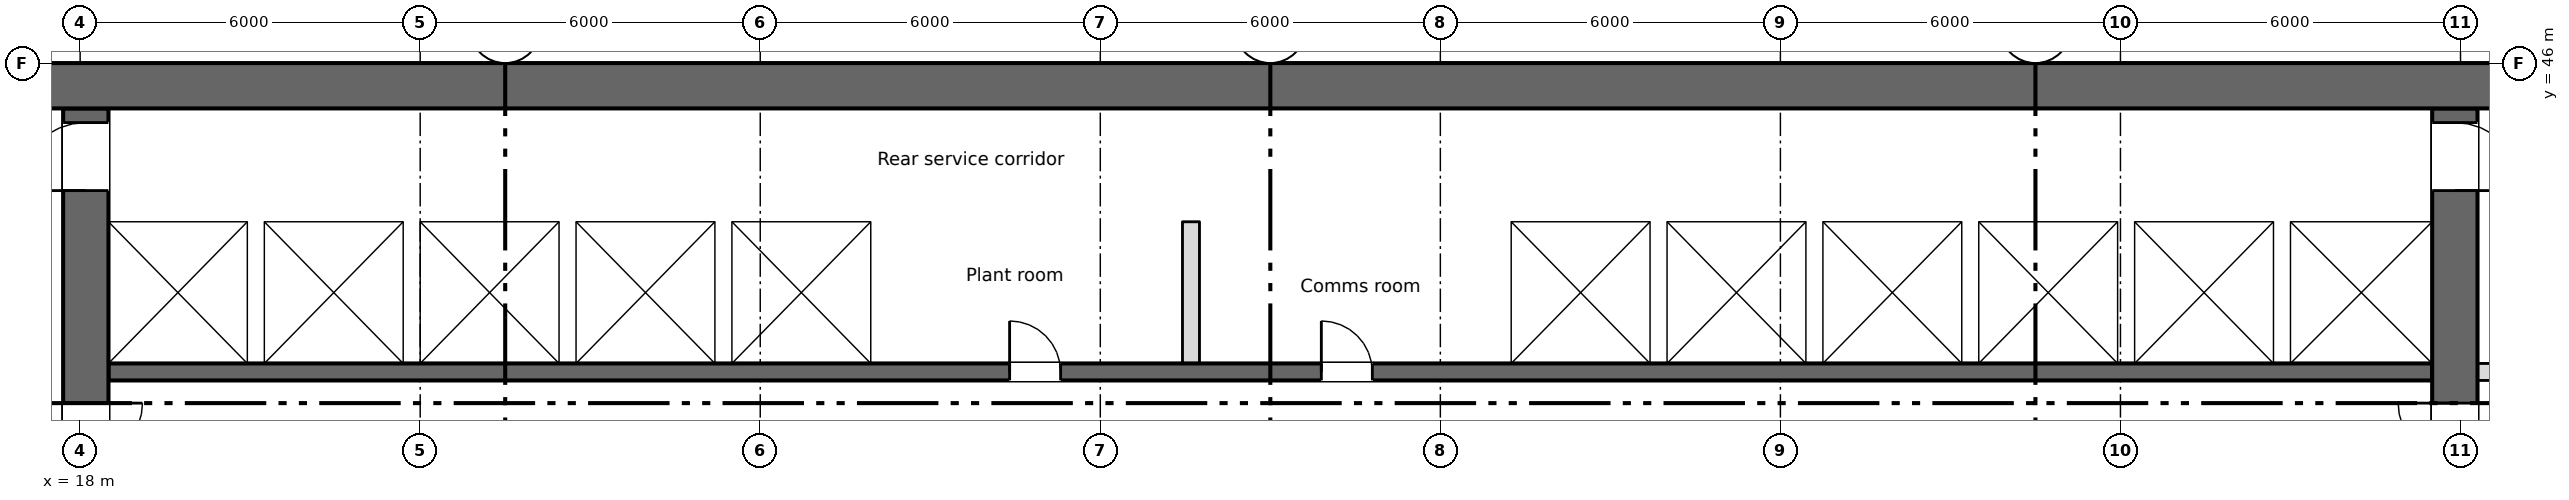
"""IFC4 building model, lengths in metres.
Left out: names, types, materials, properties, quantities, classifications, styles, units other than length and angle.
Written with IfcOpenShell. Run it as: python <this file> out.ifc"""

import sys

from ifc_helpers import new_model, si_unit, direction, frame, frame_2d, origin, place, context, subcontext, project, spatial, rectangle, extrude, element, fill, save


model = new_model("IFC4")
c1 = context("Model", 3, precision=1e-05, world=origin(), true_north=direction((0.0, 1.0)))
c2 = subcontext(c1, "Body", "Model", "MODEL_VIEW")
j1 = project(units=[si_unit("LENGTHUNIT", "METRE"), si_unit("PLANEANGLEUNIT", "RADIAN")], contexts=[c1])
p1 = place(None, origin())
s1 = spatial("IfcSite", under=j1, at=p1, CompositionType="ELEMENT")
p2 = place(p1, origin())
s2 = spatial("IfcBuilding", under=s1, at=p2, CompositionType="ELEMENT")
p3 = place(p2, frame((0.0, 0.0, 132.5)))
s3 = spatial("IfcBuildingStorey", under=s2, at=p3, CompositionType="ELEMENT", Elevation=132.5)
p4 = place(p3, frame((5.55, 45.6, 0.0), z_axis=(0.0, 0.0, 1.0), x_axis=(1.0, 0.0, 0.0)))
e1 = element("IfcWall", 1, at=p4, inside=s3, PredefinedType="SHEAR", context=c2, shape_type="SweptSolid", body=[
    extrude(rectangle(XDim=60.9, YDim=0.8, at=frame_2d((30.45, 0.0))), origin(), (0.0, 0.0, 1.0), 3.35),
])
p5 = place(p4, frame((1.2, 0.0, 0.6)))
e2 = element("IfcOpeningElement", 2, at=p5, cuts=e1, PredefinedType="OPENING", context=c2, shape_type="SweptSolid", body=[
    extrude(rectangle(XDim=0.6, YDim=2.4, at=frame_2d((0.3, 1.2))), frame((0.0, 0.41, 0.0), z_axis=(0.0, -1.0, 0.0), x_axis=(1.0, 0.0, 0.0)), (0.0, 0.0, 1.0), 0.82),
])
p6 = place(p4, frame((7.2, 0.0, 0.6)))
e3 = element("IfcOpeningElement", 3, at=p6, cuts=e1, PredefinedType="OPENING", context=c2, shape_type="SweptSolid", body=[
    extrude(rectangle(XDim=0.6, YDim=2.4, at=frame_2d((0.3, 1.2))), frame((0.0, 0.41, 0.0), z_axis=(0.0, -1.0, 0.0), x_axis=(1.0, 0.0, 0.0)), (0.0, 0.0, 1.0), 0.82),
])
p7 = place(p4, frame((55.2, 0.0, 0.6)))
e4 = element("IfcOpeningElement", 4, at=p7, cuts=e1, PredefinedType="OPENING", context=c2, shape_type="SweptSolid", body=[
    extrude(rectangle(XDim=0.6, YDim=2.4, at=frame_2d((0.3, 1.2))), frame((0.0, 0.41, 0.0), z_axis=(0.0, -1.0, 0.0), x_axis=(1.0, 0.0, 0.0)), (0.0, 0.0, 1.0), 0.82),
])
p8 = place(p3, frame((18.1, 28.4, 0.0), z_axis=(0.0, 0.0, 1.0), x_axis=(0.0, 1.0, 0.0)))
e5 = element("IfcWall", 5, at=p8, inside=s3, PredefinedType="SHEAR", context=c2, shape_type="SweptSolid", body=[
    extrude(rectangle(XDim=16.8, YDim=0.8, at=frame_2d((8.4, 0.0))), origin(), (0.0, 0.0, 1.0), 3.35),
])
p9 = place(p8, frame((9.6, 0.0, 0.0)))
e6 = element("IfcOpeningElement", 6, at=p9, cuts=e5, PredefinedType="OPENING", context=c2, shape_type="SweptSolid", body=[
    extrude(rectangle(XDim=2.0, YDim=2.1, at=frame_2d((1.0, 1.05))), frame((0.0, 0.41, 0.0), z_axis=(0.0, -1.0, 0.0), x_axis=(1.0, 0.0, 0.0)), (0.0, 0.0, 1.0), 0.82),
])
p10 = place(p8, frame((15.35, 0.0, 0.0)))
e7 = element("IfcOpeningElement", 7, at=p10, cuts=e5, PredefinedType="OPENING", context=c2, shape_type="SweptSolid", body=[
    extrude(rectangle(XDim=1.2, YDim=2.1, at=frame_2d((0.6, 1.05))), frame((0.0, 0.41, 0.0), z_axis=(0.0, -1.0, 0.0), x_axis=(1.0, 0.0, 0.0)), (0.0, 0.0, 1.0), 0.82),
])
p11 = place(p3, frame((59.9, 28.4, 0.0), z_axis=(0.0, 0.0, 1.0), x_axis=(0.0, 1.0, 0.0)))
e8 = element("IfcWall", 8, at=p11, inside=s3, PredefinedType="SHEAR", context=c2, shape_type="SweptSolid", body=[
    extrude(rectangle(XDim=16.8, YDim=0.8, at=frame_2d((8.4, 0.0))), origin(), (0.0, 0.0, 1.0), 3.35),
])
p12 = place(p11, frame((9.6, 0.0, 0.0)))
e9 = element("IfcOpeningElement", 9, at=p12, cuts=e8, PredefinedType="OPENING", context=c2, shape_type="SweptSolid", body=[
    extrude(rectangle(XDim=2.0, YDim=2.1, at=frame_2d((1.0, 1.05))), frame((0.0, 0.41, 0.0), z_axis=(0.0, -1.0, 0.0), x_axis=(1.0, 0.0, 0.0)), (0.0, 0.0, 1.0), 0.82),
])
p13 = place(p11, frame((15.35, 0.0, 0.0)))
e10 = element("IfcOpeningElement", 10, at=p13, cuts=e8, PredefinedType="OPENING", context=c2, shape_type="SweptSolid", body=[
    extrude(rectangle(XDim=1.2, YDim=2.1, at=frame_2d((0.6, 1.05))), frame((0.0, 0.41, 0.0), z_axis=(0.0, -1.0, 0.0), x_axis=(1.0, 0.0, 0.0)), (0.0, 0.0, 1.0), 0.82),
])
p14 = place(p3, frame((18.5, 40.55, 0.0), z_axis=(0.0, 0.0, 1.0), x_axis=(1.0, 0.0, 0.0)))
e11 = element("IfcWall", 11, at=p14, inside=s3, PredefinedType="SHEAR", context=c2, shape_type="SweptSolid", body=[
    extrude(rectangle(XDim=41.0, YDim=0.3, at=frame_2d((20.5, 0.0))), origin(), (0.0, 0.0, 1.0), 3.35),
])
p15 = place(p14, frame((15.9, 0.0, 0.0)))
e12 = element("IfcOpeningElement", 12, at=p15, cuts=e11, PredefinedType="OPENING", context=c2, shape_type="SweptSolid", body=[
    extrude(rectangle(XDim=0.9, YDim=2.1, at=frame_2d((0.45, 1.05))), frame((0.0, 0.16, 0.0), z_axis=(0.0, -1.0, 0.0), x_axis=(1.0, 0.0, 0.0)), (0.0, 0.0, 1.0), 0.32),
])
p16 = place(p14, frame((21.4, 0.0, 0.0)))
e13 = element("IfcOpeningElement", 13, at=p16, cuts=e11, PredefinedType="OPENING", context=c2, shape_type="SweptSolid", body=[
    extrude(rectangle(XDim=0.9, YDim=2.1, at=frame_2d((0.45, 1.05))), frame((0.0, 0.16, 0.0), z_axis=(0.0, -1.0, 0.0), x_axis=(1.0, 0.0, 0.0)), (0.0, 0.0, 1.0), 0.32),
])
p17 = place(p14, frame((6.175, 0.0, 0.0)))
e14 = element("IfcOpeningElement", 14, at=p17, cuts=e11, PredefinedType="OPENING", context=c2, shape_type="SweptSolid", body=[
    extrude(rectangle(XDim=1.1, YDim=2.1, at=frame_2d((0.55, 1.05))), frame((0.0, 0.16, 0.0), z_axis=(0.0, -1.0, 0.0), x_axis=(1.0, 0.0, 0.0)), (0.0, 0.0, 1.0), 0.32),
])
p18 = place(p14, frame((8.925, 0.0, 0.0)))
e15 = element("IfcOpeningElement", 15, at=p18, cuts=e11, PredefinedType="OPENING", context=c2, shape_type="SweptSolid", body=[
    extrude(rectangle(XDim=1.1, YDim=2.1, at=frame_2d((0.55, 1.05))), frame((0.0, 0.16, 0.0), z_axis=(0.0, -1.0, 0.0), x_axis=(1.0, 0.0, 0.0)), (0.0, 0.0, 1.0), 0.32),
])
p19 = place(p14, frame((11.675, 0.0, 0.0)))
e16 = element("IfcOpeningElement", 16, at=p19, cuts=e11, PredefinedType="OPENING", context=c2, shape_type="SweptSolid", body=[
    extrude(rectangle(XDim=1.1, YDim=2.1, at=frame_2d((0.55, 1.05))), frame((0.0, 0.16, 0.0), z_axis=(0.0, -1.0, 0.0), x_axis=(1.0, 0.0, 0.0)), (0.0, 0.0, 1.0), 0.32),
])
p20 = place(p14, frame((30.925, 0.0, 0.0)))
e17 = element("IfcOpeningElement", 17, at=p20, cuts=e11, PredefinedType="OPENING", context=c2, shape_type="SweptSolid", body=[
    extrude(rectangle(XDim=1.1, YDim=2.1, at=frame_2d((0.55, 1.05))), frame((0.0, 0.16, 0.0), z_axis=(0.0, -1.0, 0.0), x_axis=(1.0, 0.0, 0.0)), (0.0, 0.0, 1.0), 0.32),
])
p21 = place(p14, frame((33.675, 0.0, 0.0)))
e18 = element("IfcOpeningElement", 18, at=p21, cuts=e11, PredefinedType="OPENING", context=c2, shape_type="SweptSolid", body=[
    extrude(rectangle(XDim=1.1, YDim=2.1, at=frame_2d((0.55, 1.05))), frame((0.0, 0.16, 0.0), z_axis=(0.0, -1.0, 0.0), x_axis=(1.0, 0.0, 0.0)), (0.0, 0.0, 1.0), 0.32),
])
p22 = place(p14, frame((36.375, 0.0, 0.0)))
e19 = element("IfcOpeningElement", 19, at=p22, cuts=e11, PredefinedType="OPENING", context=c2, shape_type="SweptSolid", body=[
    extrude(rectangle(XDim=1.2, YDim=2.1, at=frame_2d((0.6, 1.05))), frame((0.0, 0.16, 0.0), z_axis=(0.0, -1.0, 0.0), x_axis=(1.0, 0.0, 0.0)), (0.0, 0.0, 1.0), 0.32),
])
p23 = place(p14, frame((39.15, 0.0, 0.0)))
e20 = element("IfcOpeningElement", 20, at=p23, cuts=e11, PredefinedType="OPENING", context=c2, shape_type="SweptSolid", body=[
    extrude(rectangle(XDim=1.2, YDim=2.1, at=frame_2d((0.6, 1.05))), frame((0.0, 0.16, 0.0), z_axis=(0.0, -1.0, 0.0), x_axis=(1.0, 0.0, 0.0)), (0.0, 0.0, 1.0), 0.32),
])
p24 = place(p3, frame((18.5, 43.35, 0.0), z_axis=(0.0, 0.0, 1.0), x_axis=(1.0, 0.0, 0.0)))
e21 = element("IfcWall", 21, at=p24, inside=s3, PredefinedType="SHEAR", context=c2, shape_type="SweptSolid", body=[
    extrude(rectangle(XDim=41.0, YDim=0.3, at=frame_2d((20.5, 0.0))), origin(), (0.0, 0.0, 1.0), 3.35),
])
p25 = place(p3, frame((60.3, 40.55, 0.0), z_axis=(0.0, 0.0, 1.0), x_axis=(1.0, 0.0, 0.0)))
e22 = element("IfcWall", 22, at=p25, inside=s3, PredefinedType="PARTITIONING", context=c2, shape_type="SweptSolid", body=[
    extrude(rectangle(XDim=2.4, YDim=0.3, at=frame_2d((1.2, 0.0))), origin(), (0.0, 0.0, 1.0), 3.35),
])
p26 = place(p25, frame((0.675, 0.0, 0.0)))
e23 = element("IfcOpeningElement", 23, at=p26, cuts=e22, PredefinedType="OPENING", context=c2, shape_type="SweptSolid", body=[
    extrude(rectangle(XDim=0.9, YDim=2.1, at=frame_2d((0.45, 1.05))), frame((0.0, 0.16, 0.0), z_axis=(0.0, -1.0, 0.0), x_axis=(1.0, 0.0, 0.0)), (0.0, 0.0, 1.0), 0.32),
])
for number, where, z_axis, x_axis in (
    (24, (21.1, 40.7, 0.0), (0.0, 0.0, 1.0), (0.0, 1.0, 0.0)),
    (25, (23.85, 40.7, 0.0), (0.0, 0.0, 1.0), (0.0, 1.0, 0.0)),
    (26, (26.6, 40.7, 0.0), (0.0, 0.0, 1.0), (0.0, 1.0, 0.0)),
    (27, (29.35, 40.7, 0.0), (0.0, 0.0, 1.0), (0.0, 1.0, 0.0)),
    (28, (32.1, 40.7, 0.0), (0.0, 0.0, 1.0), (0.0, 1.0, 0.0)),
    (29, (43.1, 40.7, 0.0), (0.0, 0.0, 1.0), (0.0, 1.0, 0.0)),
    (30, (45.85, 40.7, 0.0), (0.0, 0.0, 1.0), (0.0, 1.0, 0.0)),
    (31, (48.6, 40.7, 0.0), (0.0, 0.0, 1.0), (0.0, 1.0, 0.0)),
    (32, (51.35, 40.7, 0.0), (0.0, 0.0, 1.0), (0.0, 1.0, 0.0)),
    (33, (54.1, 40.7, 0.0), (0.0, 0.0, 1.0), (0.0, 1.0, 0.0)),
    (34, (56.85, 40.7, 0.0), (0.0, 0.0, 1.0), (0.0, 1.0, 0.0)),
):
    element("IfcWall", number, at=place(p3, frame(where, z_axis=z_axis, x_axis=x_axis)), inside=s3, PredefinedType="SHEAR", context=c2, shape_type="SweptSolid", body=[
        extrude(rectangle(XDim=2.5, YDim=0.3, at=frame_2d((1.25, 0.0))), origin(), (0.0, 0.0, 1.0), 3.35),
    ])
p27 = place(p3, frame((37.6, 40.7, 0.0), z_axis=(0.0, 0.0, 1.0), x_axis=(0.0, 1.0, 0.0)))
e35 = element("IfcWall", 35, at=p27, inside=s3, PredefinedType="PARTITIONING", context=c2, shape_type="SweptSolid", body=[
    extrude(rectangle(XDim=2.5, YDim=0.3, at=frame_2d((1.25, 0.0))), origin(), (0.0, 0.0, 1.0), 3.35),
])
p28 = place(p15, origin())
e36 = element("IfcDoor", 36, at=p28, inside=s3, OperationType="SINGLE_SWING_LEFT", PredefinedType="DOOR", context=c2, shape_type="SweptSolid", body=[
    extrude(rectangle(XDim=0.9, YDim=2.1, at=frame_2d((0.45, 1.05))), frame((0.0, 0.025, 0.0), z_axis=(0.0, -1.0, 0.0), x_axis=(1.0, 0.0, 0.0)), (0.0, 0.0, 1.0), 0.05),
])
fill(e12, e36)
p29 = place(p16, origin())
e37 = element("IfcDoor", 37, at=p29, inside=s3, OperationType="SINGLE_SWING_LEFT", PredefinedType="DOOR", context=c2, shape_type="SweptSolid", body=[
    extrude(rectangle(XDim=0.9, YDim=2.1, at=frame_2d((0.45, 1.05))), frame((0.0, 0.025, 0.0), z_axis=(0.0, -1.0, 0.0), x_axis=(1.0, 0.0, 0.0)), (0.0, 0.0, 1.0), 0.05),
])
fill(e13, e37)
p30 = place(p17, origin())
e38 = element("IfcDoor", 38, at=p30, inside=s3, OperationType="SLIDING_TO_LEFT", PredefinedType="DOOR", context=c2, shape_type="SweptSolid", body=[
    extrude(rectangle(XDim=1.1, YDim=2.1, at=frame_2d((0.55, 1.05))), frame((0.0, 0.025, 0.0), z_axis=(0.0, -1.0, 0.0), x_axis=(1.0, 0.0, 0.0)), (0.0, 0.0, 1.0), 0.05),
])
fill(e14, e38)
p31 = place(p18, origin())
e39 = element("IfcDoor", 39, at=p31, inside=s3, OperationType="SLIDING_TO_LEFT", PredefinedType="DOOR", context=c2, shape_type="SweptSolid", body=[
    extrude(rectangle(XDim=1.1, YDim=2.1, at=frame_2d((0.55, 1.05))), frame((0.0, 0.025, 0.0), z_axis=(0.0, -1.0, 0.0), x_axis=(1.0, 0.0, 0.0)), (0.0, 0.0, 1.0), 0.05),
])
fill(e15, e39)
p32 = place(p19, origin())
e40 = element("IfcDoor", 40, at=p32, inside=s3, OperationType="SLIDING_TO_LEFT", PredefinedType="DOOR", context=c2, shape_type="SweptSolid", body=[
    extrude(rectangle(XDim=1.1, YDim=2.1, at=frame_2d((0.55, 1.05))), frame((0.0, 0.025, 0.0), z_axis=(0.0, -1.0, 0.0), x_axis=(1.0, 0.0, 0.0)), (0.0, 0.0, 1.0), 0.05),
])
fill(e16, e40)
p33 = place(p20, origin())
e41 = element("IfcDoor", 41, at=p33, inside=s3, OperationType="SLIDING_TO_LEFT", PredefinedType="DOOR", context=c2, shape_type="SweptSolid", body=[
    extrude(rectangle(XDim=1.1, YDim=2.1, at=frame_2d((0.55, 1.05))), frame((0.0, 0.025, 0.0), z_axis=(0.0, -1.0, 0.0), x_axis=(1.0, 0.0, 0.0)), (0.0, 0.0, 1.0), 0.05),
])
fill(e17, e41)
p34 = place(p21, origin())
e42 = element("IfcDoor", 42, at=p34, inside=s3, OperationType="SLIDING_TO_LEFT", PredefinedType="DOOR", context=c2, shape_type="SweptSolid", body=[
    extrude(rectangle(XDim=1.1, YDim=2.1, at=frame_2d((0.55, 1.05))), frame((0.0, 0.025, 0.0), z_axis=(0.0, -1.0, 0.0), x_axis=(1.0, 0.0, 0.0)), (0.0, 0.0, 1.0), 0.05),
])
fill(e18, e42)
p35 = place(p22, origin())
e43 = element("IfcDoor", 43, at=p35, inside=s3, OperationType="SLIDING_TO_LEFT", PredefinedType="DOOR", context=c2, shape_type="SweptSolid", body=[
    extrude(rectangle(XDim=1.2, YDim=2.1, at=frame_2d((0.6, 1.05))), frame((0.0, 0.025, 0.0), z_axis=(0.0, -1.0, 0.0), x_axis=(1.0, 0.0, 0.0)), (0.0, 0.0, 1.0), 0.05),
])
fill(e19, e43)
p36 = place(p23, origin())
e44 = element("IfcDoor", 44, at=p36, inside=s3, OperationType="SLIDING_TO_LEFT", PredefinedType="DOOR", context=c2, shape_type="SweptSolid", body=[
    extrude(rectangle(XDim=1.2, YDim=2.1, at=frame_2d((0.6, 1.05))), frame((0.0, 0.025, 0.0), z_axis=(0.0, -1.0, 0.0), x_axis=(1.0, 0.0, 0.0)), (0.0, 0.0, 1.0), 0.05),
])
fill(e20, e44)
p37 = place(p9, origin())
e45 = element("IfcDoor", 45, at=p37, inside=s3, OperationType="DOUBLE_DOOR_SINGLE_SWING", PredefinedType="DOOR", context=c2, shape_type="SweptSolid", body=[
    extrude(rectangle(XDim=2.0, YDim=2.1, at=frame_2d((1.0, 1.05))), frame((0.0, 0.025, 0.0), z_axis=(0.0, -1.0, 0.0), x_axis=(1.0, 0.0, 0.0)), (0.0, 0.0, 1.0), 0.05),
])
fill(e6, e45)
p38 = place(p12, origin())
e46 = element("IfcDoor", 46, at=p38, inside=s3, OperationType="DOUBLE_DOOR_SINGLE_SWING", PredefinedType="DOOR", context=c2, shape_type="SweptSolid", body=[
    extrude(rectangle(XDim=2.0, YDim=2.1, at=frame_2d((1.0, 1.05))), frame((0.0, 0.025, 0.0), z_axis=(0.0, -1.0, 0.0), x_axis=(1.0, 0.0, 0.0)), (0.0, 0.0, 1.0), 0.05),
])
fill(e9, e46)
p39 = place(p10, origin())
e47 = element("IfcDoor", 47, at=p39, inside=s3, OperationType="SINGLE_SWING_LEFT", PredefinedType="DOOR", context=c2, shape_type="SweptSolid", body=[
    extrude(rectangle(XDim=1.2, YDim=2.1, at=frame_2d((0.6, 1.05))), frame((0.0, 0.025, 0.0), z_axis=(0.0, -1.0, 0.0), x_axis=(1.0, 0.0, 0.0)), (0.0, 0.0, 1.0), 0.05),
])
fill(e7, e47)
p40 = place(p13, origin())
e48 = element("IfcDoor", 48, at=p40, inside=s3, OperationType="SINGLE_SWING_LEFT", PredefinedType="DOOR", context=c2, shape_type="SweptSolid", body=[
    extrude(rectangle(XDim=1.2, YDim=2.1, at=frame_2d((0.6, 1.05))), frame((0.0, 0.025, 0.0), z_axis=(0.0, -1.0, 0.0), x_axis=(1.0, 0.0, 0.0)), (0.0, 0.0, 1.0), 0.05),
])
fill(e10, e48)
save(model, sys.argv[1])
